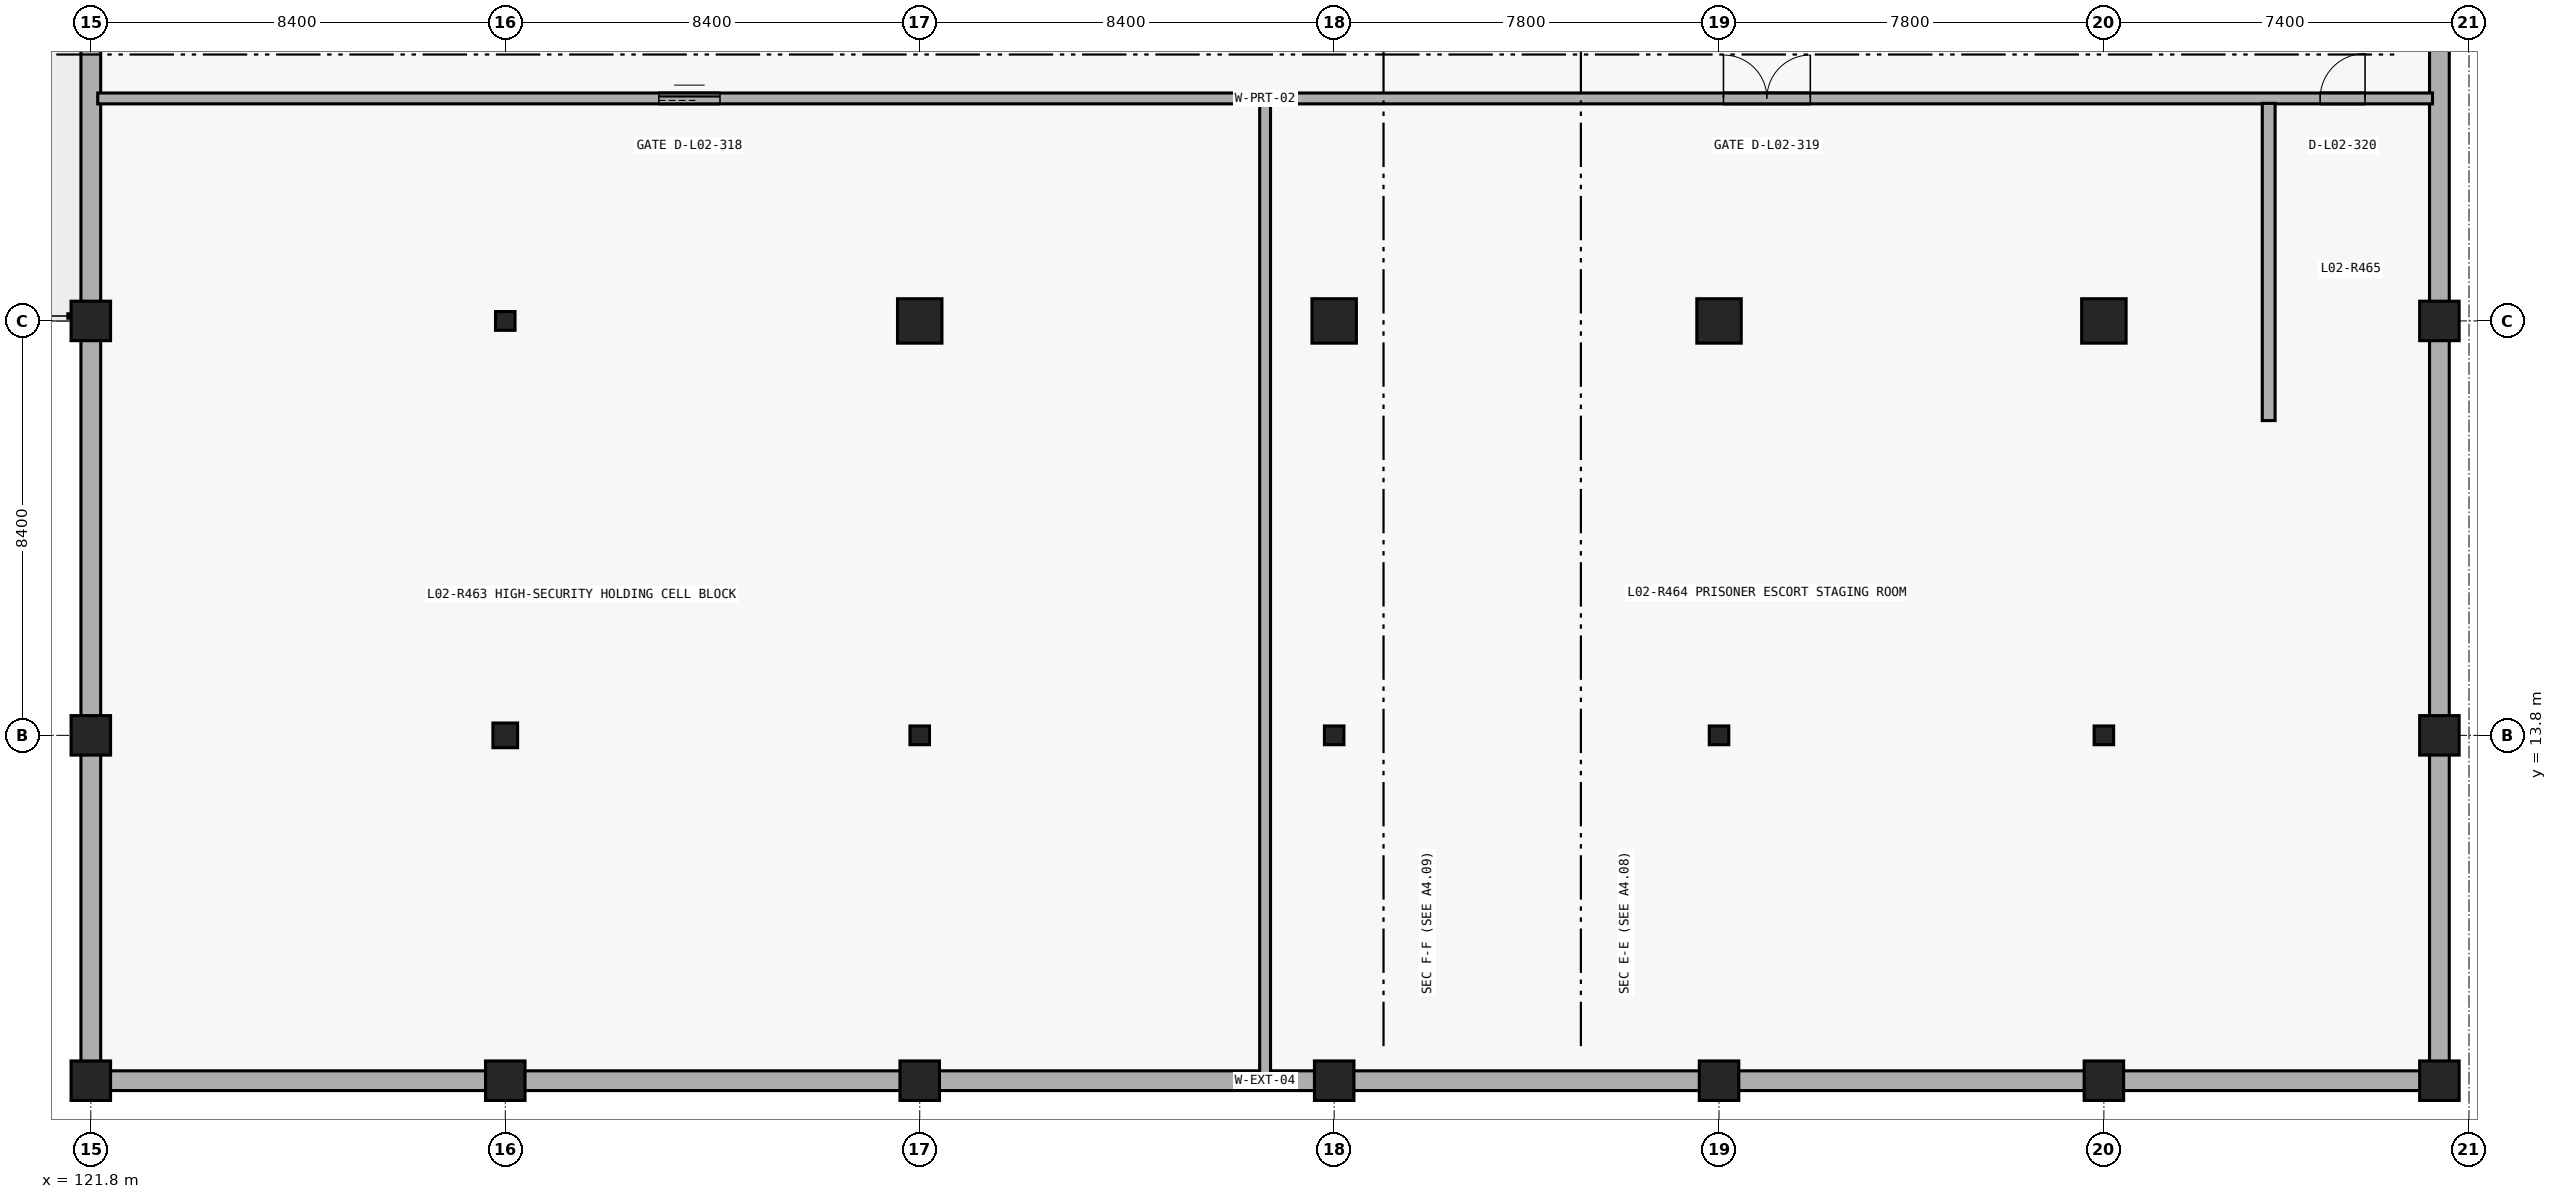
"""IFC4 building model, lengths in metres.
Left out: names, types, materials, properties, quantities, classifications, styles, units other than length and angle.
Written with IfcOpenShell. Run it as: python <this file> out.ifc"""

import sys

from ifc_helpers import new_model, si_unit, direction, frame, frame_2d, origin_with_axes, origin_2d_with_axis, place, context, subcontext, project, spatial, rectangle, circle, i_section, extrude, element, fill, save


model = new_model("IFC4")
c1 = context("Model", 3, precision=1e-05, world=origin_with_axes(), true_north=direction((0.0, 1.0)))
c2 = subcontext(c1, "Body", "Model", "MODEL_VIEW")
j1 = project(units=[si_unit("LENGTHUNIT", "METRE"), si_unit("PLANEANGLEUNIT", "RADIAN")], contexts=[c1])
p1 = place(None, origin_with_axes())
s1 = spatial("IfcSite", under=j1, at=p1, CompositionType="ELEMENT")
p2 = place(p1, origin_with_axes())
s2 = spatial("IfcBuilding", under=s1, at=p2, CompositionType="ELEMENT")
p3 = place(p2, frame((0.0, 0.0, 10.8), z_axis=(0.0, 0.0, 1.0), x_axis=(1.0, 0.0, 0.0)))
s3 = spatial("IfcBuildingStorey", under=s2, at=p3, CompositionType="ELEMENT", Elevation=10.8)
p4 = place(None, frame((121.8, 6.8, 10.8), z_axis=(0.0, 0.0, 1.0), x_axis=(1.0, 0.0, 0.0)))
e1 = element("IfcWall", 1, at=p4, inside=s3, PredefinedType="SOLIDWALL", context=c2, shape_type="SweptSolid", body=[
    extrude(rectangle(XDim=47.6, YDim=0.4, at=frame_2d((23.8, 0.0), x_axis=(1.0, 0.0))), origin_with_axes(), (0.0, 0.0, 1.0), 4.124),
])
p5 = place(None, frame((169.4, 7.06, 10.8), z_axis=(0.0, 0.0, 1.0), x_axis=(0.0, 1.0, 0.0)))
e2 = element("IfcWall", 2, at=p5, inside=s3, PredefinedType="SOLIDWALL", context=c2, shape_type="SweptSolid", body=[
    extrude(rectangle(XDim=47.28, YDim=0.4, at=frame_2d((23.64, 0.0), x_axis=(1.0, 0.0))), origin_with_axes(), (0.0, 0.0, 1.0), 4.124),
])
p6 = place(None, frame((121.8, 54.34, 10.8), z_axis=(0.0, 0.0, 1.0), x_axis=(0.0, -1.0, 0.0)))
e3 = element("IfcWall", 3, at=p6, inside=s3, PredefinedType="SOLIDWALL", context=c2, shape_type="SweptSolid", body=[
    extrude(rectangle(XDim=47.28, YDim=0.4, at=frame_2d((23.64, 0.0), x_axis=(1.0, 0.0))), origin_with_axes(), (0.0, 0.0, 1.0), 4.124),
])
p7 = place(None, frame((121.8, 32.4, 10.8), z_axis=(0.0, 0.0, 1.0), x_axis=(0.0, -1.0, 0.0)))
e4 = element("IfcOpeningElement", 4, at=p7, cuts=e3, PredefinedType="OPENING", context=c2, shape_type="SweptSolid", body=[
    extrude(rectangle(XDim=1.1, YDim=2.3, at=frame_2d((0.0, 1.15), x_axis=(1.0, 0.0))), frame((0.0, 0.21, 0.0), z_axis=(0.0, -1.0, 0.0), x_axis=(1.0, 0.0, 0.0)), (0.0, 0.0, 1.0), 0.42),
])
p8 = place(None, frame((121.94, 26.71, 10.8), z_axis=(0.0, 0.0, 1.0), x_axis=(1.0, 0.0, 0.0)))
e5 = element("IfcWall", 5, at=p8, inside=s3, PredefinedType="PARTITIONING", context=c2, shape_type="SweptSolid", body=[
    extrude(rectangle(XDim=47.32, YDim=0.22, at=frame_2d((23.66, 0.0), x_axis=(1.0, 0.0))), origin_with_axes(), (0.0, 0.0, 1.0), 4.44),
])
p9 = place(None, frame((133.932, 26.71, 10.8), z_axis=(0.0, 0.0, 1.0), x_axis=(1.0, 0.0, 0.0)))
e6 = element("IfcOpeningElement", 6, at=p9, cuts=e5, PredefinedType="OPENING", context=c2, shape_type="SweptSolid", body=[
    extrude(rectangle(XDim=1.24, YDim=2.22, at=frame_2d((0.0, 1.11), x_axis=(1.0, 0.0))), frame((0.0, 0.12, 0.0), z_axis=(0.0, -1.0, 0.0), x_axis=(1.0, 0.0, 0.0)), (0.0, 0.0, 1.0), 0.24),
])
p10 = place(None, frame((155.77, 26.71, 10.8), z_axis=(0.0, 0.0, 1.0), x_axis=(1.0, 0.0, 0.0)))
e7 = element("IfcOpeningElement", 7, at=p10, cuts=e5, PredefinedType="OPENING", context=c2, shape_type="SweptSolid", body=[
    extrude(rectangle(XDim=1.76, YDim=2.26, at=frame_2d((0.0, 1.13), x_axis=(1.0, 0.0))), frame((0.0, 0.12, 0.0), z_axis=(0.0, -1.0, 0.0), x_axis=(1.0, 0.0, 0.0)), (0.0, 0.0, 1.0), 0.24),
])
p11 = place(None, frame((167.438, 26.71, 10.8), z_axis=(0.0, 0.0, 1.0), x_axis=(1.0, 0.0, 0.0)))
e8 = element("IfcOpeningElement", 8, at=p11, cuts=e5, PredefinedType="OPENING", context=c2, shape_type="SweptSolid", body=[
    extrude(rectangle(XDim=0.91, YDim=2.12, at=frame_2d((0.0, 1.06), x_axis=(1.0, 0.0))), frame((0.0, 0.12, 0.0), z_axis=(0.0, -1.0, 0.0), x_axis=(1.0, 0.0, 0.0)), (0.0, 0.0, 1.0), 0.24),
])
p12 = place(None, frame((165.94, 20.18, 10.8), z_axis=(0.0, 0.0, 1.0), x_axis=(0.0, 1.0, 0.0)))
e9 = element("IfcWall", 9, at=p12, inside=s3, PredefinedType="PLUMBINGWALL", context=c2, shape_type="SweptSolid", body=[
    extrude(rectangle(XDim=6.43, YDim=0.26, at=frame_2d((3.215, 0.0), x_axis=(1.0, 0.0))), origin_with_axes(), (0.0, 0.0, 1.0), 4.44),
])
p13 = place(None, frame((145.6, 6.94, 10.8), z_axis=(0.0, 0.0, 1.0), x_axis=(0.0, 1.0, 0.0)))
e10 = element("IfcWall", 10, at=p13, inside=s3, PredefinedType="PARTITIONING", context=c2, shape_type="SweptSolid", body=[
    extrude(rectangle(XDim=19.77, YDim=0.22, at=frame_2d((9.885, 0.0), x_axis=(1.0, 0.0))), origin_with_axes(), (0.0, 0.0, 1.0), 4.44),
])
for number, where, z_axis, x_axis in (
    (11, (121.8, 6.8, 10.8), (0.0, 0.0, 1.0), (1.0, 0.0, 0.0)),
    (12, (121.8, 13.8, 10.8), (0.0, 0.0, 1.0), (1.0, 0.0, 0.0)),
    (13, (121.8, 22.2, 10.8), (0.0, 0.0, 1.0), (1.0, 0.0, 0.0)),
    (14, (130.2, 6.8, 10.8), (0.0, 0.0, 1.0), (1.0, 0.0, 0.0)),
):
    element("IfcColumn", number, at=place(None, frame(where, z_axis=z_axis, x_axis=x_axis)), inside=s3, PredefinedType="COLUMN", context=c2, shape_type="SweptSolid", body=[
        extrude(circle(Radius=0.4, at=origin_2d_with_axis()), origin_with_axes(), (0.0, 0.0, 1.0), 4.8),
    ])
p14 = place(None, frame((130.2, 13.8, 10.8), z_axis=(0.0, 0.0, 1.0), x_axis=(1.0, 0.0, 0.0)))
e15 = element("IfcColumn", 15, at=p14, inside=s3, PredefinedType="COLUMN", context=c2, shape_type="SweptSolid", body=[
    extrude(i_section(OverallWidth=0.5, OverallDepth=0.5, WebThickness=0.022, FlangeThickness=0.036, at=origin_2d_with_axis()), origin_with_axes(), (0.0, 0.0, 1.0), 4.8),
])
p15 = place(None, frame((130.2, 22.2, 10.8), z_axis=(0.0, 0.0, 1.0), x_axis=(1.0, 0.0, 0.0)))
e16 = element("IfcColumn", 16, at=p15, inside=s3, PredefinedType="COLUMN", context=c2, shape_type="SweptSolid", body=[
    extrude(i_section(OverallWidth=0.395, OverallDepth=0.38, WebThickness=0.019, FlangeThickness=0.03, at=origin_2d_with_axis()), origin_with_axes(), (0.0, 0.0, 1.0), 4.8),
])
p16 = place(None, frame((138.6, 6.8, 10.8), z_axis=(0.0, 0.0, 1.0), x_axis=(1.0, 0.0, 0.0)))
e17 = element("IfcColumn", 17, at=p16, inside=s3, PredefinedType="COLUMN", context=c2, shape_type="SweptSolid", body=[
    extrude(circle(Radius=0.4, at=origin_2d_with_axis()), origin_with_axes(), (0.0, 0.0, 1.0), 4.8),
])
p17 = place(None, frame((138.6, 13.8, 10.8), z_axis=(0.0, 0.0, 1.0), x_axis=(1.0, 0.0, 0.0)))
e18 = element("IfcColumn", 18, at=p17, inside=s3, PredefinedType="COLUMN", context=c2, shape_type="SweptSolid", body=[
    extrude(i_section(OverallWidth=0.395, OverallDepth=0.38, WebThickness=0.019, FlangeThickness=0.03, at=origin_2d_with_axis()), origin_with_axes(), (0.0, 0.0, 1.0), 4.8),
])
p18 = place(None, frame((138.6, 22.2, 10.8), z_axis=(0.0, 0.0, 1.0), x_axis=(1.0, 0.0, 0.0)))
e19 = element("IfcColumn", 19, at=p18, inside=s3, PredefinedType="COLUMN", context=c2, shape_type="SweptSolid", body=[
    extrude(rectangle(XDim=0.9, YDim=0.9, at=origin_2d_with_axis()), origin_with_axes(), (0.0, 0.0, 1.0), 4.8),
])
p19 = place(None, frame((147.0, 6.8, 10.8), z_axis=(0.0, 0.0, 1.0), x_axis=(1.0, 0.0, 0.0)))
e20 = element("IfcColumn", 20, at=p19, inside=s3, PredefinedType="COLUMN", context=c2, shape_type="SweptSolid", body=[
    extrude(circle(Radius=0.4, at=origin_2d_with_axis()), origin_with_axes(), (0.0, 0.0, 1.0), 4.8),
])
p20 = place(None, frame((147.0, 13.8, 10.8), z_axis=(0.0, 0.0, 1.0), x_axis=(1.0, 0.0, 0.0)))
e21 = element("IfcColumn", 21, at=p20, inside=s3, PredefinedType="COLUMN", context=c2, shape_type="SweptSolid", body=[
    extrude(i_section(OverallWidth=0.395, OverallDepth=0.38, WebThickness=0.019, FlangeThickness=0.03, at=origin_2d_with_axis()), origin_with_axes(), (0.0, 0.0, 1.0), 4.8),
])
p21 = place(None, frame((147.0, 22.2, 10.8), z_axis=(0.0, 0.0, 1.0), x_axis=(1.0, 0.0, 0.0)))
e22 = element("IfcColumn", 22, at=p21, inside=s3, PredefinedType="COLUMN", context=c2, shape_type="SweptSolid", body=[
    extrude(rectangle(XDim=0.9, YDim=0.9, at=origin_2d_with_axis()), origin_with_axes(), (0.0, 0.0, 1.0), 4.8),
])
p22 = place(None, frame((154.8, 6.8, 10.8), z_axis=(0.0, 0.0, 1.0), x_axis=(1.0, 0.0, 0.0)))
e23 = element("IfcColumn", 23, at=p22, inside=s3, PredefinedType="COLUMN", context=c2, shape_type="SweptSolid", body=[
    extrude(circle(Radius=0.4, at=origin_2d_with_axis()), origin_with_axes(), (0.0, 0.0, 1.0), 4.8),
])
p23 = place(None, frame((154.8, 13.8, 10.8), z_axis=(0.0, 0.0, 1.0), x_axis=(1.0, 0.0, 0.0)))
e24 = element("IfcColumn", 24, at=p23, inside=s3, PredefinedType="COLUMN", context=c2, shape_type="SweptSolid", body=[
    extrude(i_section(OverallWidth=0.395, OverallDepth=0.38, WebThickness=0.019, FlangeThickness=0.03, at=origin_2d_with_axis()), origin_with_axes(), (0.0, 0.0, 1.0), 4.8),
])
p24 = place(None, frame((154.8, 22.2, 10.8), z_axis=(0.0, 0.0, 1.0), x_axis=(1.0, 0.0, 0.0)))
e25 = element("IfcColumn", 25, at=p24, inside=s3, PredefinedType="COLUMN", context=c2, shape_type="SweptSolid", body=[
    extrude(rectangle(XDim=0.9, YDim=0.9, at=origin_2d_with_axis()), origin_with_axes(), (0.0, 0.0, 1.0), 4.8),
])
p25 = place(None, frame((162.6, 6.8, 10.8), z_axis=(0.0, 0.0, 1.0), x_axis=(1.0, 0.0, 0.0)))
e26 = element("IfcColumn", 26, at=p25, inside=s3, PredefinedType="COLUMN", context=c2, shape_type="SweptSolid", body=[
    extrude(circle(Radius=0.4, at=origin_2d_with_axis()), origin_with_axes(), (0.0, 0.0, 1.0), 4.8),
])
p26 = place(None, frame((162.6, 13.8, 10.8), z_axis=(0.0, 0.0, 1.0), x_axis=(1.0, 0.0, 0.0)))
e27 = element("IfcColumn", 27, at=p26, inside=s3, PredefinedType="COLUMN", context=c2, shape_type="SweptSolid", body=[
    extrude(i_section(OverallWidth=0.395, OverallDepth=0.38, WebThickness=0.019, FlangeThickness=0.03, at=origin_2d_with_axis()), origin_with_axes(), (0.0, 0.0, 1.0), 4.8),
])
p27 = place(None, frame((162.6, 22.2, 10.8), z_axis=(0.0, 0.0, 1.0), x_axis=(1.0, 0.0, 0.0)))
e28 = element("IfcColumn", 28, at=p27, inside=s3, PredefinedType="COLUMN", context=c2, shape_type="SweptSolid", body=[
    extrude(rectangle(XDim=0.9, YDim=0.9, at=origin_2d_with_axis()), origin_with_axes(), (0.0, 0.0, 1.0), 4.8),
])
for number, where, z_axis, x_axis in (
    (29, (169.4, 6.8, 10.8), (0.0, 0.0, 1.0), (1.0, 0.0, 0.0)),
    (30, (169.4, 13.8, 10.8), (0.0, 0.0, 1.0), (1.0, 0.0, 0.0)),
    (31, (169.4, 22.2, 10.8), (0.0, 0.0, 1.0), (1.0, 0.0, 0.0)),
):
    element("IfcColumn", number, at=place(None, frame(where, z_axis=z_axis, x_axis=x_axis)), inside=s3, PredefinedType="COLUMN", context=c2, shape_type="SweptSolid", body=[
        extrude(circle(Radius=0.4, at=origin_2d_with_axis()), origin_with_axes(), (0.0, 0.0, 1.0), 4.8),
    ])
p28 = place(None, frame((133.932, 26.71, 10.8), z_axis=(0.0, 0.0, 1.0), x_axis=(1.0, 0.0, 0.0)))
e32 = element("IfcDoor", 32, at=p28, inside=s3, OperationType="SLIDING_TO_LEFT", PredefinedType="GATE", context=c2, shape_type="SweptSolid", body=[
    extrude(rectangle(XDim=1.24, YDim=2.22, at=frame_2d((0.0, 1.11), x_axis=(1.0, 0.0))), frame((0.0, 0.04, 0.0), z_axis=(0.0, -1.0, 0.0), x_axis=(1.0, 0.0, 0.0)), (0.0, 0.0, 1.0), 0.08),
])
fill(e6, e32)
p29 = place(None, frame((155.77, 26.71, 10.8), z_axis=(0.0, 0.0, 1.0), x_axis=(1.0, 0.0, 0.0)))
e33 = element("IfcDoor", 33, at=p29, inside=s3, OperationType="DOUBLE_DOOR_SINGLE_SWING", PredefinedType="GATE", context=c2, shape_type="SweptSolid", body=[
    extrude(rectangle(XDim=1.76, YDim=2.26, at=frame_2d((0.0, 1.13), x_axis=(1.0, 0.0))), frame((0.0, 0.04, 0.0), z_axis=(0.0, -1.0, 0.0), x_axis=(1.0, 0.0, 0.0)), (0.0, 0.0, 1.0), 0.08),
])
fill(e7, e33)
p30 = place(None, frame((167.438, 26.71, 10.8), z_axis=(0.0, 0.0, 1.0), x_axis=(1.0, 0.0, 0.0)))
e34 = element("IfcDoor", 34, at=p30, inside=s3, OperationType="SINGLE_SWING_RIGHT", PredefinedType="DOOR", context=c2, shape_type="SweptSolid", body=[
    extrude(rectangle(XDim=0.91, YDim=2.12, at=frame_2d((0.0, 1.06), x_axis=(1.0, 0.0))), frame((0.0, 0.04, 0.0), z_axis=(0.0, -1.0, 0.0), x_axis=(1.0, 0.0, 0.0)), (0.0, 0.0, 1.0), 0.08),
])
fill(e8, e34)
save(model, sys.argv[1])
